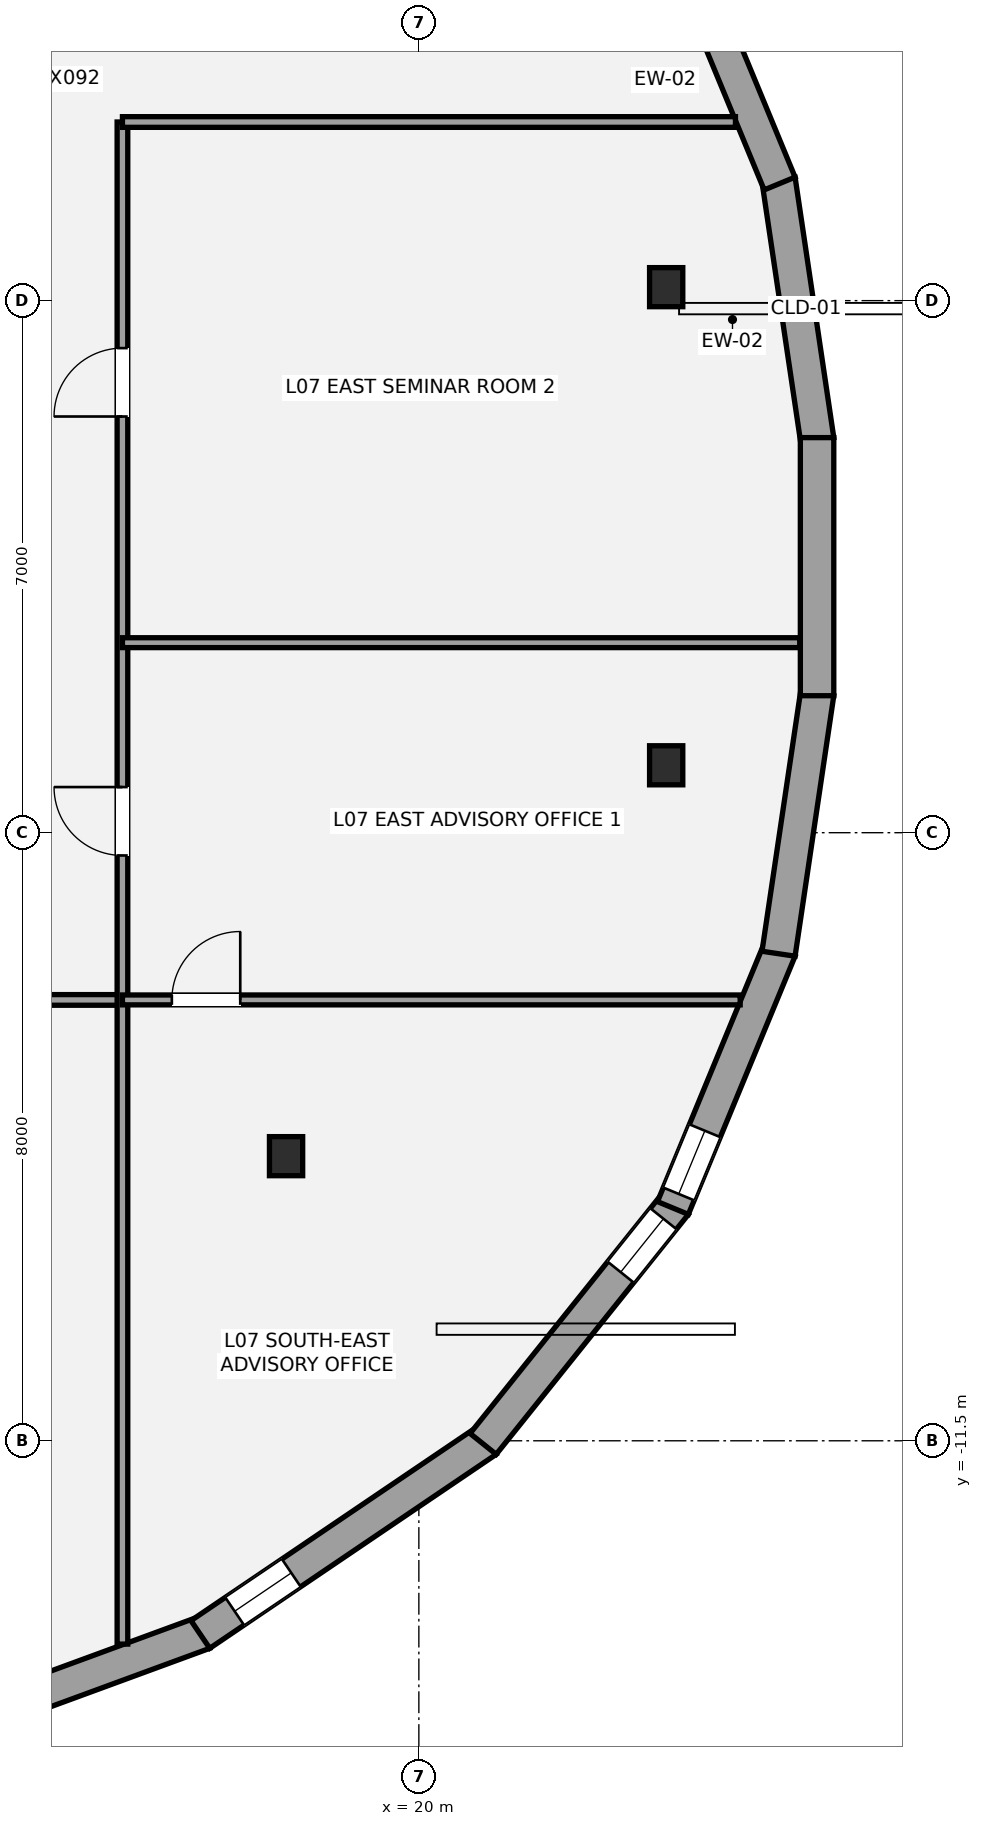
"""IFC4 building model, lengths in metres.
Left out: names, types, materials, properties, quantities, classifications, styles, units other than length and angle.
Written with IfcOpenShell. Run it as: python <this file> out.ifc"""

import sys

from ifc_helpers import new_model, si_unit, direction, frame, frame_2d, origin, origin_2d, place, context, subcontext, project, spatial, rectangle, i_section, extrude, element, fill, save


model = new_model("IFC4")
c1 = context("Model", 3, precision=1e-05, world=origin(), true_north=direction((0.0, 1.0)))
c2 = subcontext(c1, "Body", "Model", "MODEL_VIEW")
j1 = project(units=[si_unit("LENGTHUNIT", "METRE"), si_unit("PLANEANGLEUNIT", "RADIAN")], contexts=[c1])
p1 = place(None, origin())
s1 = spatial("IfcSite", under=j1, at=p1, CompositionType="ELEMENT")
p2 = place(p1, origin())
s2 = spatial("IfcBuilding", under=s1, at=p2, CompositionType="ELEMENT")
p3 = place(p2, frame((0.0, 0.0, 30.6)))
s3 = spatial("IfcBuildingStorey", under=s2, at=p3, CompositionType="ELEMENT", Elevation=30.6)
for number, where, z_axis, x_axis in (
    (1, (23.254, 3.677, 0.0), (0.0, 0.0, 1.0), (1.0, 0.0, 0.0)),
    (2, (18.253, -7.756, 0.0), (0.0, 0.0, 1.0), (1.0, 0.0, 0.0)),
    (3, (23.254, -2.613, 0.0), (0.0, 0.0, 1.0), (1.0, 0.0, 0.0)),
):
    element("IfcColumn", number, at=place(p3, frame(where, z_axis=z_axis, x_axis=x_axis)), inside=s3, PredefinedType="COLUMN", context=c2, shape_type="SweptSolid", body=[
        extrude(i_section(OverallWidth=0.437, OverallDepth=0.514, WebThickness=0.061, FlangeThickness=0.097, at=origin_2d()), origin(), (0.0, 0.0, 1.0), 3.6),
    ])
p4 = place(p3, frame((24.732, 5.092, 0.0), z_axis=(0.0, 0.0, 1.0), x_axis=(0.147003256829, -0.989136008081, 0.0)))
e4 = element("IfcWall", 4, at=p4, inside=s3, PredefinedType="STANDARD", context=c2, shape_type="SweptSolid", body=[
    extrude(rectangle(XDim=3.464, YDim=0.44, at=frame_2d((1.732, 0.0))), origin(), (0.0, 0.0, 1.0), 2.533),
])
p5 = place(p3, frame((23.343, 8.438, 0.0), z_axis=(0.0, 0.0, 1.0), x_axis=(0.381925438614, -0.92419313963, 0.0)))
e5 = element("IfcWall", 5, at=p5, inside=s3, PredefinedType="STANDARD", context=c2, shape_type="SweptSolid", body=[
    extrude(rectangle(XDim=3.676, YDim=0.44, at=frame_2d((1.838, 0.0))), origin(), (0.0, 0.0, 1.0), 2.533),
])
p6 = place(p3, frame((17.173, -14.024, 0.0), z_axis=(0.0, 0.0, 1.0), x_axis=(-0.938710986641, -0.344705212552, 0.0)))
e6 = element("IfcWall", 6, at=p6, inside=s3, PredefinedType="STANDARD", context=c2, shape_type="SweptSolid", body=[
    extrude(rectangle(XDim=4.967, YDim=0.44, at=frame_2d((2.483, 0.0))), origin(), (0.0, 0.0, 1.0), 2.529),
])
p7 = place(p6, frame((3.57, 0.0, 0.58)))
e7 = element("IfcOpeningElement", 7, at=p7, cuts=e6, PredefinedType="OPENING", context=c2, shape_type="SweptSolid", body=[
    extrude(rectangle(XDim=0.9, YDim=1.35, at=frame_2d((0.45, 0.675))), frame((0.0, 0.23, 0.0), z_axis=(0.0, -1.0, 0.0), x_axis=(1.0, 0.0, 0.0)), (0.0, 0.0, 1.0), 0.46),
])
p8 = place(p3, frame((20.894, -11.496, 0.0), z_axis=(0.0, 0.0, 1.0), x_axis=(-0.828051238664, -0.560652429003, 0.0)))
e8 = element("IfcWall", 8, at=p8, inside=s3, PredefinedType="STANDARD", context=c2, shape_type="SweptSolid", body=[
    extrude(rectangle(XDim=4.552, YDim=0.44, at=frame_2d((2.276, 0.0))), origin(), (0.0, 0.0, 1.0), 2.533),
])
p9 = place(p8, frame((3.107, 0.0, 0.58)))
e9 = element("IfcOpeningElement", 9, at=p9, cuts=e8, PredefinedType="OPENING", context=c2, shape_type="SweptSolid", body=[
    extrude(rectangle(XDim=0.9, YDim=1.35, at=frame_2d((0.45, 0.675))), frame((0.0, 0.23, 0.0), z_axis=(0.0, -1.0, 0.0), x_axis=(1.0, 0.0, 0.0)), (0.0, 0.0, 1.0), 0.46),
])
p10 = place(p3, frame((23.375, -8.384, 0.0), z_axis=(0.0, 0.0, 1.0), x_axis=(-0.625180729177, -0.780480016314, 0.0)))
e10 = element("IfcWall", 10, at=p10, inside=s3, PredefinedType="STANDARD", context=c2, shape_type="SweptSolid", body=[
    extrude(rectangle(XDim=4.045, YDim=0.44, at=frame_2d((2.022, 0.0))), origin(), (0.0, 0.0, 1.0), 2.533),
])
p11 = place(p10, frame((0.25, 0.0, 0.58)))
e11 = element("IfcOpeningElement", 11, at=p11, cuts=e10, PredefinedType="OPENING", context=c2, shape_type="SweptSolid", body=[
    extrude(rectangle(XDim=0.9, YDim=1.35, at=frame_2d((0.45, 0.675))), frame((0.0, 0.23, 0.0), z_axis=(0.0, -1.0, 0.0), x_axis=(1.0, 0.0, 0.0)), (0.0, 0.0, 1.0), 0.46),
])
p12 = place(p3, frame((24.747, -5.041, 0.0), z_axis=(0.0, 0.0, 1.0), x_axis=(-0.381925438614, -0.92419313963, 0.0)))
e12 = element("IfcWall", 12, at=p12, inside=s3, PredefinedType="STANDARD", context=c2, shape_type="SweptSolid", body=[
    extrude(rectangle(XDim=3.676, YDim=0.44, at=frame_2d((1.838, 0.0))), origin(), (0.0, 0.0, 1.0), 2.533),
])
p13 = place(p12, frame((2.576, 0.0, 0.42)))
e13 = element("IfcOpeningElement", 13, at=p13, cuts=e12, PredefinedType="OPENING", context=c2, shape_type="SweptSolid", body=[
    extrude(rectangle(XDim=0.9, YDim=1.35, at=frame_2d((0.45, 0.675))), frame((0.0, 0.23, 0.0), z_axis=(0.0, -1.0, 0.0), x_axis=(1.0, 0.0, 0.0)), (0.0, 0.0, 1.0), 0.46),
])
p14 = place(p3, frame((25.242, -1.666, 0.0), z_axis=(0.0, 0.0, 1.0), x_axis=(-0.147003256829, -0.989136008081, 0.0)))
e14 = element("IfcWall", 14, at=p14, inside=s3, PredefinedType="STANDARD", context=c2, shape_type="SweptSolid", body=[
    extrude(rectangle(XDim=3.464, YDim=0.44, at=frame_2d((1.732, 0.0))), origin(), (0.0, 0.0, 1.0), 2.533),
])
p15 = place(p3, frame((25.239, 1.698, 0.0), z_axis=(0.0, 0.0, 1.0), x_axis=(0.0, -1.0, 0.0)))
e15 = element("IfcWall", 15, at=p15, inside=s3, PredefinedType="STANDARD", context=c2, shape_type="SweptSolid", body=[
    extrude(rectangle(XDim=3.396, YDim=0.44, at=frame_2d((1.698, 0.0))), origin(), (0.0, 0.0, 1.0), 2.533),
])
p16 = place(p3, frame((-16.1, -5.7, 0.0), z_axis=(0.0, 0.0, 1.0), x_axis=(1.0, 0.0, 0.0)))
e16 = element("IfcWall", 16, at=p16, inside=s3, PredefinedType="PARTITIONING", context=c2, shape_type="SweptSolid", body=[
    extrude(rectangle(XDim=32.2, YDim=0.14, at=frame_2d((16.1, 0.0))), origin(), (0.0, 0.0, 1.0), 2.853),
])
p17 = place(p16, frame((3.6, 0.0, 0.0)))
e17 = element("IfcOpeningElement", 17, at=p17, cuts=e16, PredefinedType="OPENING", context=c2, shape_type="SweptSolid", body=[
    extrude(rectangle(XDim=0.9, YDim=2.1, at=frame_2d((0.45, 1.05))), frame((0.0, 0.08, 0.0), z_axis=(0.0, -1.0, 0.0), x_axis=(1.0, 0.0, 0.0)), (0.0, 0.0, 1.0), 0.16),
])
p18 = place(p16, frame((11.35, 0.0, 0.0)))
e18 = element("IfcOpeningElement", 18, at=p18, cuts=e16, PredefinedType="OPENING", context=c2, shape_type="SweptSolid", body=[
    extrude(rectangle(XDim=1.5, YDim=2.15, at=frame_2d((0.75, 1.075))), frame((0.0, 0.08, 0.0), z_axis=(0.0, -1.0, 0.0), x_axis=(1.0, 0.0, 0.0)), (0.0, 0.0, 1.0), 0.16),
])
p19 = place(p16, frame((19.65, 0.0, 0.0)))
e19 = element("IfcOpeningElement", 19, at=p19, cuts=e16, PredefinedType="OPENING", context=c2, shape_type="SweptSolid", body=[
    extrude(rectangle(XDim=0.9, YDim=2.1, at=frame_2d((0.45, 1.05))), frame((0.0, 0.08, 0.0), z_axis=(0.0, -1.0, 0.0), x_axis=(1.0, 0.0, 0.0)), (0.0, 0.0, 1.0), 0.16),
])
p20 = place(p16, frame((27.7, 0.0, 0.0)))
e20 = element("IfcOpeningElement", 20, at=p20, cuts=e16, PredefinedType="OPENING", context=c2, shape_type="SweptSolid", body=[
    extrude(rectangle(XDim=0.9, YDim=2.1, at=frame_2d((0.45, 1.05))), frame((0.0, 0.08, 0.0), z_axis=(0.0, -1.0, 0.0), x_axis=(1.0, 0.0, 0.0)), (0.0, 0.0, 1.0), 0.16),
])
p21 = place(p3, frame((16.1, -14.175, 0.0), z_axis=(0.0, 0.0, 1.0), x_axis=(0.0, 1.0, 0.0)))
e21 = element("IfcWall", 21, at=p21, inside=s3, PredefinedType="PARTITIONING", context=c2, shape_type="SweptSolid", body=[
    extrude(rectangle(XDim=20.025, YDim=0.14, at=frame_2d((10.012, 0.0))), origin(), (0.0, 0.0, 1.0), 2.841),
])
p22 = place(p21, frame((10.375, 0.0, 0.0)))
e22 = element("IfcOpeningElement", 22, at=p22, cuts=e21, PredefinedType="OPENING", context=c2, shape_type="SweptSolid", body=[
    extrude(rectangle(XDim=0.9, YDim=2.1, at=frame_2d((0.45, 1.05))), frame((0.0, 0.08, 0.0), z_axis=(0.0, -1.0, 0.0), x_axis=(1.0, 0.0, 0.0)), (0.0, 0.0, 1.0), 0.16),
])
p23 = place(p21, frame((16.15, 0.0, 0.0)))
e23 = element("IfcOpeningElement", 23, at=p23, cuts=e21, PredefinedType="OPENING", context=c2, shape_type="SweptSolid", body=[
    extrude(rectangle(XDim=0.9, YDim=2.1, at=frame_2d((0.45, 1.05))), frame((0.0, 0.08, 0.0), z_axis=(0.0, -1.0, 0.0), x_axis=(1.0, 0.0, 0.0)), (0.0, 0.0, 1.0), 0.16),
])
p24 = place(p3, frame((16.1, 5.85, 0.0), z_axis=(0.0, 0.0, 1.0), x_axis=(1.0, 0.0, 0.0)))
e24 = element("IfcWall", 24, at=p24, inside=s3, PredefinedType="PARTITIONING", context=c2, shape_type="SweptSolid", body=[
    extrude(rectangle(XDim=8.065, YDim=0.14, at=frame_2d((4.033, 0.0))), origin(), (0.0, 0.0, 1.0), 3.4),
])
p25 = place(p3, frame((16.1, -5.7, 0.0), z_axis=(0.0, 0.0, 1.0), x_axis=(1.0, 0.0, 0.0)))
e25 = element("IfcWall", 25, at=p25, inside=s3, PredefinedType="PARTITIONING", context=c2, shape_type="SweptSolid", body=[
    extrude(rectangle(XDim=8.127, YDim=0.13, at=frame_2d((4.063, 0.0))), origin(), (0.0, 0.0, 1.0), 2.779),
])
p26 = place(p25, frame((0.65, 0.0, 0.0)))
e26 = element("IfcOpeningElement", 26, at=p26, cuts=e25, PredefinedType="OPENING", context=c2, shape_type="SweptSolid", body=[
    extrude(rectangle(XDim=0.9, YDim=2.1, at=frame_2d((0.45, 1.05))), frame((0.0, 0.075, 0.0), z_axis=(0.0, -1.0, 0.0), x_axis=(1.0, 0.0, 0.0)), (0.0, 0.0, 1.0), 0.15),
])
p27 = place(p3, frame((16.1, -1.0, 0.0), z_axis=(0.0, 0.0, 1.0), x_axis=(1.0, 0.0, 0.0)))
e27 = element("IfcWall", 27, at=p27, inside=s3, PredefinedType="PARTITIONING", context=c2, shape_type="SweptSolid", body=[
    extrude(rectangle(XDim=8.911, YDim=0.13, at=frame_2d((4.456, 0.0))), origin(), (0.0, 0.0, 1.0), 2.841),
])
p28 = place(p9, origin())
e28 = element("IfcWindow", 28, at=p28, inside=s3, PartitioningType="SINGLE_PANEL", PredefinedType="WINDOW", context=c2, shape_type="SweptSolid", body=[
    extrude(rectangle(XDim=0.9, YDim=1.35, at=frame_2d((0.45, 0.675))), frame((0.0, -0.01, 0.0), z_axis=(0.0, -1.0, 0.0), x_axis=(1.0, 0.0, 0.0)), (0.0, 0.0, 1.0), 0.06),
])
fill(e9, e28)
p29 = place(p11, origin())
e29 = element("IfcWindow", 29, at=p29, inside=s3, PartitioningType="SINGLE_PANEL", PredefinedType="WINDOW", context=c2, shape_type="SweptSolid", body=[
    extrude(rectangle(XDim=0.9, YDim=1.35, at=frame_2d((0.45, 0.675))), frame((0.0, -0.01, 0.0), z_axis=(0.0, -1.0, 0.0), x_axis=(1.0, 0.0, 0.0)), (0.0, 0.0, 1.0), 0.06),
])
fill(e11, e29)
p30 = place(p13, origin())
e30 = element("IfcWindow", 30, at=p30, inside=s3, PartitioningType="SINGLE_PANEL", PredefinedType="WINDOW", context=c2, shape_type="SweptSolid", body=[
    extrude(rectangle(XDim=0.9, YDim=1.35, at=frame_2d((0.45, 0.675))), frame((0.0, -0.01, 0.0), z_axis=(0.0, -1.0, 0.0), x_axis=(1.0, 0.0, 0.0)), (0.0, 0.0, 1.0), 0.06),
])
fill(e13, e30)
p31 = place(p26, origin())
e31 = element("IfcDoor", 31, at=p31, inside=s3, OperationType="SINGLE_SWING_RIGHT", PredefinedType="DOOR", context=c2, shape_type="SweptSolid", body=[
    extrude(rectangle(XDim=0.9, YDim=2.1, at=frame_2d((0.45, 1.05))), frame((0.0, 0.025, 0.0), z_axis=(0.0, -1.0, 0.0), x_axis=(1.0, 0.0, 0.0)), (0.0, 0.0, 1.0), 0.05),
])
fill(e26, e31)
p32 = place(p22, origin())
e32 = element("IfcDoor", 32, at=p32, inside=s3, OperationType="SINGLE_SWING_RIGHT", PredefinedType="DOOR", context=c2, shape_type="SweptSolid", body=[
    extrude(rectangle(XDim=0.9, YDim=2.1, at=frame_2d((0.45, 1.05))), frame((0.0, 0.025, 0.0), z_axis=(0.0, -1.0, 0.0), x_axis=(1.0, 0.0, 0.0)), (0.0, 0.0, 1.0), 0.05),
])
fill(e22, e32)
p33 = place(p23, origin())
e33 = element("IfcDoor", 33, at=p33, inside=s3, OperationType="SINGLE_SWING_LEFT", PredefinedType="DOOR", context=c2, shape_type="SweptSolid", body=[
    extrude(rectangle(XDim=0.9, YDim=2.1, at=frame_2d((0.45, 1.05))), frame((0.0, 0.025, 0.0), z_axis=(0.0, -1.0, 0.0), x_axis=(1.0, 0.0, 0.0)), (0.0, 0.0, 1.0), 0.05),
])
fill(e23, e33)
save(model, sys.argv[1])
